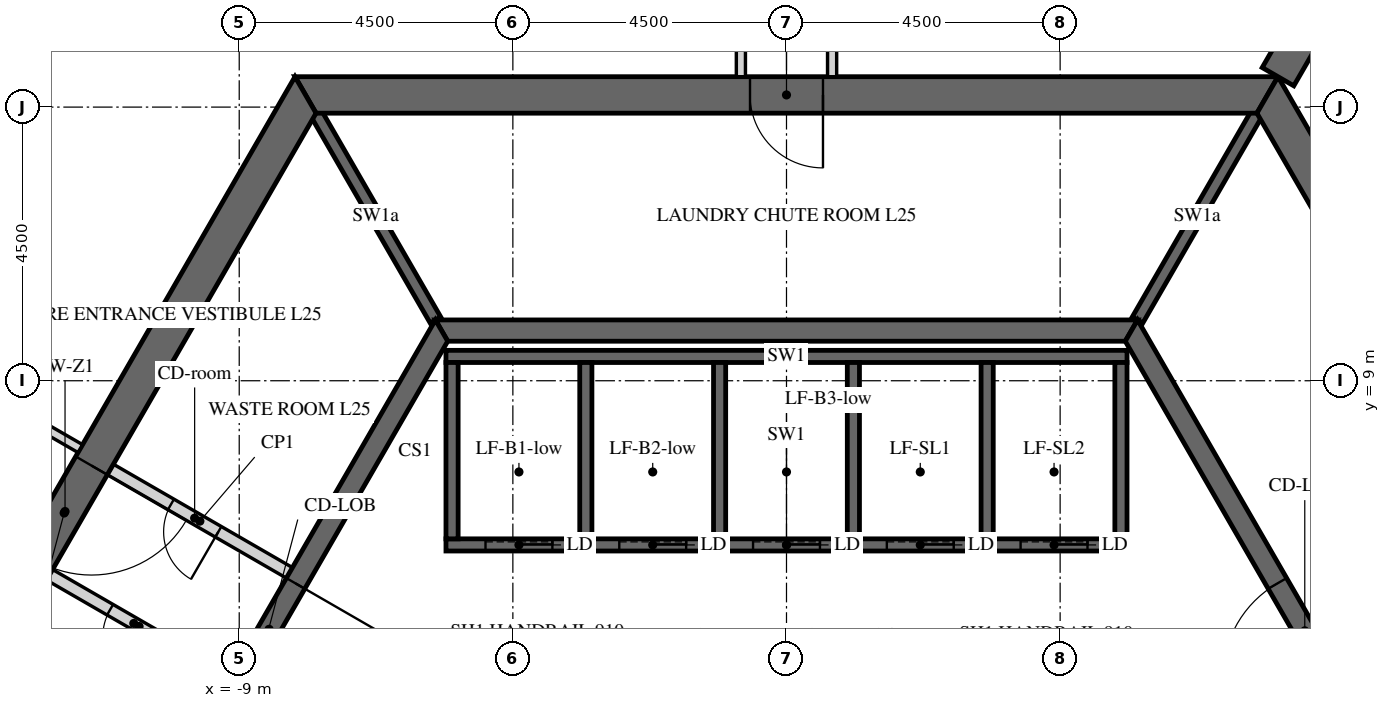
"""IFC4 building model, lengths in metres.
Left out: names, types, materials, properties, quantities, classifications, styles, units other than length and angle.
Written with IfcOpenShell. Run it as: python <this file> out.ifc"""

import sys

from ifc_helpers import new_model, si_unit, direction, frame, frame_2d, origin, place, context, subcontext, project, spatial, polyline, rectangle, outline, extrude, element, fill, save


model = new_model("IFC4")
c1 = context("Model", 3, precision=1e-05, world=origin(), true_north=direction((0.0, 1.0)))
c2 = subcontext(c1, "Body", "Model", "MODEL_VIEW")
j1 = project(units=[si_unit("LENGTHUNIT", "METRE"), si_unit("PLANEANGLEUNIT", "RADIAN")], contexts=[c1])
p1 = place(None, origin())
s1 = spatial("IfcSite", under=j1, at=p1, CompositionType="ELEMENT")
p2 = place(p1, origin())
s2 = spatial("IfcBuilding", under=s1, at=p2, CompositionType="ELEMENT")
p3 = place(p2, frame((0.0, 0.0, 111.6)))
s3 = spatial("IfcBuildingStorey", under=s2, at=p3, CompositionType="ELEMENT", Elevation=111.6)
p4 = place(p3, frame((-7.91, 13.7, -0.15), z_axis=(0.0, 0.0, 1.0), x_axis=(-0.499999880136, -0.866025472988, 0.0)))
e1 = element("IfcWall", 1, at=p4, inside=s3, PredefinedType="SHEAR", context=c2, shape_type="SweptSolid", body=[
    extrude(outline(polyline([(-0.173, -0.3), (15.993, -0.3), (15.646, 0.3), (0.173, 0.3), (-0.173, -0.3)])), origin(), (0.0, 0.0, 1.0), 3.9),
])
p5 = place(p4, frame((7.039, 0.0, 0.15)))
e2 = element("IfcOpeningElement", 2, at=p5, cuts=e1, PredefinedType="OPENING", context=c2, shape_type="SweptSolid", body=[
    extrude(rectangle(XDim=1.8, YDim=2.4, at=frame_2d((0.9, 1.2))), frame((0.0, 0.31, 0.0), z_axis=(0.0, -1.0, 0.0), x_axis=(1.0, 0.0, 0.0)), (0.0, 0.0, 1.0), 0.62),
])
p6 = place(p3, frame((15.819, 0.0, -0.15), z_axis=(0.0, 0.0, 1.0), x_axis=(-0.499999880136, 0.866025472988, 0.0)))
e3 = element("IfcWall", 3, at=p6, inside=s3, PredefinedType="SHEAR", context=c2, shape_type="SweptSolid", body=[
    extrude(outline(polyline([(-0.173, -0.3), (15.993, -0.3), (15.646, 0.3), (0.173, 0.3), (-0.173, -0.3)])), origin(), (0.0, 0.0, 1.0), 3.9),
])
p7 = place(p6, frame((6.981, 0.0, 0.15)))
e4 = element("IfcOpeningElement", 4, at=p7, cuts=e3, PredefinedType="OPENING", context=c2, shape_type="SweptSolid", body=[
    extrude(rectangle(XDim=1.8, YDim=2.4, at=frame_2d((0.9, 1.2))), frame((0.0, 0.31, 0.0), z_axis=(0.0, -1.0, 0.0), x_axis=(1.0, 0.0, 0.0)), (0.0, 0.0, 1.0), 0.62),
])
p8 = place(p3, frame((7.91, 13.7, -0.15), z_axis=(0.0, 0.0, 1.0), x_axis=(-1.0, 0.0, 0.0)))
e5 = element("IfcWall", 5, at=p8, inside=s3, PredefinedType="SHEAR", context=c2, shape_type="SweptSolid", body=[
    extrude(outline(polyline([(-0.173, -0.3), (15.993, -0.3), (15.646, 0.3), (0.173, 0.3), (-0.173, -0.3)])), origin(), (0.0, 0.0, 1.0), 3.9),
])
p9 = place(p8, frame((7.31, 0.0, 0.15)))
e6 = element("IfcOpeningElement", 6, at=p9, cuts=e5, PredefinedType="OPENING", context=c2, shape_type="SweptSolid", body=[
    extrude(rectangle(XDim=1.2, YDim=2.4, at=frame_2d((0.6, 1.2))), frame((0.0, 0.31, 0.0), z_axis=(0.0, -1.0, 0.0), x_axis=(1.0, 0.0, 0.0)), (0.0, 0.0, 1.0), 0.62),
])
p10 = place(p3, frame((8.083, 14.0, -0.15), z_axis=(0.0, 0.0, 1.0), x_axis=(0.499997680643, 0.866026742862, 0.0)))
e7 = element("IfcWall", 7, at=p10, inside=s3, PredefinedType="SHEAR", context=c2, shape_type="SweptSolid", body=[
    extrude(rectangle(XDim=16.509, YDim=0.6, at=frame_2d((8.254, 0.0))), origin(), (0.0, 0.0, 1.0), 3.9),
])
p11 = place(p10, frame((7.354, 0.0, 0.15)))
e8 = element("IfcOpeningElement", 8, at=p11, cuts=e7, PredefinedType="OPENING", context=c2, shape_type="SweptSolid", body=[
    extrude(rectangle(XDim=1.8, YDim=2.4, at=frame_2d((0.9, 1.2))), frame((0.0, 0.31, 0.0), z_axis=(0.0, -1.0, 0.0), x_axis=(1.0, 0.0, 0.0)), (0.0, 0.0, 1.0), 0.62),
])
p12 = place(p3, frame((-5.673, 9.825, -0.15), z_axis=(0.0, 0.0, 1.0), x_axis=(-0.499995046907, -0.866028263435, 0.0)))
e9 = element("IfcWall", 9, at=p12, inside=s3, PredefinedType="SHEAR", context=c2, shape_type="SweptSolid", body=[
    extrude(outline(polyline([(-0.101, -0.175), (11.446, -0.175), (11.244, 0.175), (0.101, 0.175), (-0.101, -0.175)])), origin(), (0.0, 0.0, 1.0), 3.9),
])
p13 = place(p12, frame((4.801, 0.0, 0.15)))
e10 = element("IfcOpeningElement", 10, at=p13, cuts=e9, PredefinedType="OPENING", context=c2, shape_type="SweptSolid", body=[
    extrude(rectangle(XDim=1.8, YDim=2.4, at=frame_2d((0.9, 1.2))), frame((0.0, 0.185, 0.0), z_axis=(0.0, -1.0, 0.0), x_axis=(1.0, 0.0, 0.0)), (0.0, 0.0, 1.0), 0.37),
])
p14 = place(p3, frame((11.345, 0.0, -0.15), z_axis=(0.0, 0.0, 1.0), x_axis=(-0.499995046907, 0.866028263435, 0.0)))
e11 = element("IfcWall", 11, at=p14, inside=s3, PredefinedType="SHEAR", context=c2, shape_type="SweptSolid", body=[
    extrude(outline(polyline([(-0.101, -0.175), (11.446, -0.175), (11.244, 0.175), (0.101, 0.175), (-0.101, -0.175)])), origin(), (0.0, 0.0, 1.0), 3.9),
])
p15 = place(p14, frame((4.744, 0.0, 0.15)))
e12 = element("IfcOpeningElement", 12, at=p15, cuts=e11, PredefinedType="OPENING", context=c2, shape_type="SweptSolid", body=[
    extrude(rectangle(XDim=1.8, YDim=2.4, at=frame_2d((0.9, 1.2))), frame((0.0, 0.185, 0.0), z_axis=(0.0, -1.0, 0.0), x_axis=(1.0, 0.0, 0.0)), (0.0, 0.0, 1.0), 0.37),
])
p16 = place(p3, frame((5.673, 9.825, -0.15), z_axis=(0.0, 0.0, 1.0), x_axis=(-1.0, 0.0, 0.0)))
e13 = element("IfcWall", 13, at=p16, inside=s3, PredefinedType="SHEAR", context=c2, shape_type="SweptSolid", body=[
    extrude(outline(polyline([(-0.101, -0.175), (11.446, -0.175), (11.244, 0.175), (0.101, 0.175), (-0.101, -0.175)])), origin(), (0.0, 0.0, 1.0), 3.9),
])
p17 = place(p3, frame((-5.6, 6.3, -0.25), z_axis=(0.0, 0.0, 1.0), x_axis=(1.0, 0.0, 0.0)))
e14 = element("IfcWall", 14, at=p17, inside=s3, PredefinedType="SHEAR", context=c2, shape_type="SweptSolid", body=[
    extrude(rectangle(XDim=11.2, YDim=0.2, at=frame_2d((5.6, 0.0))), origin(), (0.0, 0.0, 1.0), 3.9),
])
p18 = place(p17, frame((0.65, 0.0, 0.25)))
e15 = element("IfcOpeningElement", 15, at=p18, cuts=e14, PredefinedType="OPENING", context=c2, shape_type="SweptSolid", body=[
    extrude(rectangle(XDim=1.1, YDim=2.1, at=frame_2d((0.55, 1.05))), frame((0.0, 0.11, 0.0), z_axis=(0.0, -1.0, 0.0), x_axis=(1.0, 0.0, 0.0)), (0.0, 0.0, 1.0), 0.22),
])
p19 = place(p17, frame((2.85, 0.0, 0.25)))
e16 = element("IfcOpeningElement", 16, at=p19, cuts=e14, PredefinedType="OPENING", context=c2, shape_type="SweptSolid", body=[
    extrude(rectangle(XDim=1.1, YDim=2.1, at=frame_2d((0.55, 1.05))), frame((0.0, 0.11, 0.0), z_axis=(0.0, -1.0, 0.0), x_axis=(1.0, 0.0, 0.0)), (0.0, 0.0, 1.0), 0.22),
])
p20 = place(p17, frame((5.05, 0.0, 0.25)))
e17 = element("IfcOpeningElement", 17, at=p20, cuts=e14, PredefinedType="OPENING", context=c2, shape_type="SweptSolid", body=[
    extrude(rectangle(XDim=1.1, YDim=2.1, at=frame_2d((0.55, 1.05))), frame((0.0, 0.11, 0.0), z_axis=(0.0, -1.0, 0.0), x_axis=(1.0, 0.0, 0.0)), (0.0, 0.0, 1.0), 0.22),
])
p21 = place(p17, frame((7.25, 0.0, 0.25)))
e18 = element("IfcOpeningElement", 18, at=p21, cuts=e14, PredefinedType="OPENING", context=c2, shape_type="SweptSolid", body=[
    extrude(rectangle(XDim=1.1, YDim=2.1, at=frame_2d((0.55, 1.05))), frame((0.0, 0.11, 0.0), z_axis=(0.0, -1.0, 0.0), x_axis=(1.0, 0.0, 0.0)), (0.0, 0.0, 1.0), 0.22),
])
p22 = place(p17, frame((9.45, 0.0, 0.25)))
e19 = element("IfcOpeningElement", 19, at=p22, cuts=e14, PredefinedType="OPENING", context=c2, shape_type="SweptSolid", body=[
    extrude(rectangle(XDim=1.1, YDim=2.1, at=frame_2d((0.55, 1.05))), frame((0.0, 0.11, 0.0), z_axis=(0.0, -1.0, 0.0), x_axis=(1.0, 0.0, 0.0)), (0.0, 0.0, 1.0), 0.22),
])
p23 = place(p3, frame((-5.6, 9.4, -0.25), z_axis=(0.0, 0.0, 1.0), x_axis=(1.0, 0.0, 0.0)))
e20 = element("IfcWall", 20, at=p23, inside=s3, PredefinedType="SHEAR", context=c2, shape_type="SweptSolid", body=[
    extrude(rectangle(XDim=11.2, YDim=0.2, at=frame_2d((5.6, 0.0))), origin(), (0.0, 0.0, 1.0), 3.9),
])
for number, where, z_axis, x_axis in (
    (21, (-5.5, 6.4, -0.25), (0.0, 0.0, 1.0), (0.0, 1.0, 0.0)),
    (22, (-3.3, 6.4, -0.25), (0.0, 0.0, 1.0), (0.0, 1.0, 0.0)),
    (23, (-1.1, 6.4, -0.25), (0.0, 0.0, 1.0), (0.0, 1.0, 0.0)),
    (24, (1.1, 6.4, -0.25), (0.0, 0.0, 1.0), (0.0, 1.0, 0.0)),
    (25, (3.3, 6.4, -0.25), (0.0, 0.0, 1.0), (0.0, 1.0, 0.0)),
    (26, (5.5, 6.4, -0.25), (0.0, 0.0, 1.0), (0.0, 1.0, 0.0)),
):
    element("IfcWall", number, at=place(p3, frame(where, z_axis=z_axis, x_axis=x_axis)), inside=s3, PredefinedType="SHEAR", context=c2, shape_type="SweptSolid", body=[
        extrude(rectangle(XDim=2.9, YDim=0.2, at=frame_2d((1.45, 0.0))), origin(), (0.0, 0.0, 1.0), 3.9),
    ])
for number, where, z_axis, x_axis in (
    (27, (5.773, 10.0, -0.15), (0.0, 0.0, 1.0), (0.5, 0.866, 0.0)),
    (28, (-5.773, 10.0, -0.15), (0.0, 0.0, 1.0), (-0.5, 0.866, 0.0)),
):
    element("IfcWall", number, at=place(p3, frame(where, z_axis=z_axis, x_axis=x_axis)), inside=s3, PredefinedType="SHEAR", context=c2, shape_type="SweptSolid", body=[
        extrude(rectangle(XDim=3.926, YDim=0.2, at=frame_2d((1.963, 0.0))), origin(), (0.0, 0.0, 1.0), 3.9),
    ])
p24 = place(p3, frame((-9.175, 4.109, 0.0), z_axis=(0.0, 0.0, 1.0), x_axis=(-0.865989465428, 0.500062241894, 0.0)))
e29 = element("IfcWall", 29, at=p24, inside=s3, PredefinedType="PARTITIONING", context=c2, shape_type="SweptSolid", body=[
    extrude(rectangle(XDim=3.4, YDim=0.2, at=frame_2d((1.7, 0.0))), origin(), (0.0, 0.0, 1.0), 3.65),
])
p25 = place(p24, frame((1.351, 0.0, 0.0)))
e30 = element("IfcOpeningElement", 30, at=p25, cuts=e29, PredefinedType="OPENING", context=c2, shape_type="SweptSolid", body=[
    extrude(rectangle(XDim=0.9, YDim=2.1, at=frame_2d((0.45, 1.05))), frame((0.0, 0.11, 0.0), z_axis=(0.0, -1.0, 0.0), x_axis=(1.0, 0.0, 0.0)), (0.0, 0.0, 1.0), 0.22),
])
p26 = place(p3, frame((-8.175, 5.841, 0.0), z_axis=(0.0, 0.0, 1.0), x_axis=(-0.866020560687, 0.500008388397, 0.0)))
e31 = element("IfcWall", 31, at=p26, inside=s3, PredefinedType="PARTITIONING", context=c2, shape_type="SweptSolid", body=[
    extrude(rectangle(XDim=3.4, YDim=0.2, at=frame_2d((1.7, 0.0))), origin(), (0.0, 0.0, 1.0), 3.65),
])
p27 = place(p26, frame((1.35, 0.0, 0.0)))
e32 = element("IfcOpeningElement", 32, at=p27, cuts=e31, PredefinedType="OPENING", context=c2, shape_type="SweptSolid", body=[
    extrude(rectangle(XDim=0.9, YDim=2.1, at=frame_2d((0.45, 1.05))), frame((0.0, 0.11, 0.0), z_axis=(0.0, -1.0, 0.0), x_axis=(1.0, 0.0, 0.0)), (0.0, 0.0, 1.0), 0.22),
])
p28 = place(p3, frame((-11.614, 7.884, 0.0), z_axis=(0.0, 0.0, 1.0), x_axis=(-0.866025438137, 0.4999999405, 0.0)))
e33 = element("IfcWall", 33, at=p28, inside=s3, PredefinedType="PARTITIONING", context=c2, shape_type="SweptSolid", body=[
    extrude(rectangle(XDim=6.271, YDim=0.15, at=frame_2d((3.135, 0.0))), origin(), (0.0, 0.0, 1.0), 2.988),
])
p29 = place(p3, frame((-0.75, 20.075, 0.0), z_axis=(0.0, 0.0, 1.0), x_axis=(0.0, -1.0, 0.0)))
e34 = element("IfcWall", 34, at=p29, inside=s3, PredefinedType="PARTITIONING", context=c2, shape_type="SweptSolid", body=[
    extrude(rectangle(XDim=6.075, YDim=0.15, at=frame_2d((3.038, 0.0))), origin(), (0.0, 0.0, 1.0), 2.988),
])
p30 = place(p3, frame((0.75, 14.0, 0.0), z_axis=(0.0, 0.0, 1.0), x_axis=(0.0, 1.0, 0.0)))
e35 = element("IfcWall", 35, at=p30, inside=s3, PredefinedType="PARTITIONING", context=c2, shape_type="SweptSolid", body=[
    extrude(rectangle(XDim=6.15, YDim=0.15, at=frame_2d((3.075, 0.0))), origin(), (0.0, 0.0, 1.0), 2.988),
])
p31 = place(p5, origin())
e36 = element("IfcDoor", 36, at=p31, inside=s3, OperationType="DOUBLE_DOOR_SINGLE_SWING", PredefinedType="DOOR", context=c2, shape_type="SweptSolid", body=[
    extrude(rectangle(XDim=1.8, YDim=2.4, at=frame_2d((0.9, 1.2))), frame((0.0, 0.025, 0.0), z_axis=(0.0, -1.0, 0.0), x_axis=(1.0, 0.0, 0.0)), (0.0, 0.0, 1.0), 0.05),
])
fill(e2, e36)
p32 = place(p9, origin())
e37 = element("IfcDoor", 37, at=p32, inside=s3, OperationType="SINGLE_SWING_LEFT", PredefinedType="DOOR", context=c2, shape_type="SweptSolid", body=[
    extrude(rectangle(XDim=1.2, YDim=2.4, at=frame_2d((0.6, 1.2))), frame((0.0, 0.025, 0.0), z_axis=(0.0, -1.0, 0.0), x_axis=(1.0, 0.0, 0.0)), (0.0, 0.0, 1.0), 0.05),
])
fill(e6, e37)
p33 = place(p13, origin())
e38 = element("IfcDoor", 38, at=p33, inside=s3, OperationType="DOUBLE_DOOR_SINGLE_SWING", PredefinedType="DOOR", context=c2, shape_type="SweptSolid", body=[
    extrude(rectangle(XDim=1.8, YDim=2.4, at=frame_2d((0.9, 1.2))), frame((0.0, 0.025, 0.0), z_axis=(0.0, -1.0, 0.0), x_axis=(1.0, 0.0, 0.0)), (0.0, 0.0, 1.0), 0.05),
])
fill(e10, e38)
p34 = place(p15, origin())
e39 = element("IfcDoor", 39, at=p34, inside=s3, OperationType="DOUBLE_DOOR_SINGLE_SWING", PredefinedType="DOOR", context=c2, shape_type="SweptSolid", body=[
    extrude(rectangle(XDim=1.8, YDim=2.4, at=frame_2d((0.9, 1.2))), frame((0.0, 0.025, 0.0), z_axis=(0.0, -1.0, 0.0), x_axis=(1.0, 0.0, 0.0)), (0.0, 0.0, 1.0), 0.05),
])
fill(e12, e39)
p35 = place(p25, origin())
e40 = element("IfcDoor", 40, at=p35, inside=s3, OperationType="SINGLE_SWING_LEFT", PredefinedType="DOOR", context=c2, shape_type="SweptSolid", body=[
    extrude(rectangle(XDim=0.9, YDim=2.1, at=frame_2d((0.45, 1.05))), frame((0.0, 0.025, 0.0), z_axis=(0.0, -1.0, 0.0), x_axis=(1.0, 0.0, 0.0)), (0.0, 0.0, 1.0), 0.05),
])
fill(e30, e40)
p36 = place(p27, origin())
e41 = element("IfcDoor", 41, at=p36, inside=s3, OperationType="SINGLE_SWING_LEFT", PredefinedType="DOOR", context=c2, shape_type="SweptSolid", body=[
    extrude(rectangle(XDim=0.9, YDim=2.1, at=frame_2d((0.45, 1.05))), frame((0.0, 0.025, 0.0), z_axis=(0.0, -1.0, 0.0), x_axis=(1.0, 0.0, 0.0)), (0.0, 0.0, 1.0), 0.05),
])
fill(e32, e41)
p37 = place(p18, origin())
e42 = element("IfcDoor", 42, at=p37, inside=s3, OperationType="SLIDING_TO_LEFT", PredefinedType="DOOR", context=c2, shape_type="SweptSolid", body=[
    extrude(rectangle(XDim=1.1, YDim=2.1, at=frame_2d((0.55, 1.05))), frame((0.0, 0.025, 0.0), z_axis=(0.0, -1.0, 0.0), x_axis=(1.0, 0.0, 0.0)), (0.0, 0.0, 1.0), 0.05),
])
fill(e15, e42)
p38 = place(p19, origin())
e43 = element("IfcDoor", 43, at=p38, inside=s3, OperationType="SLIDING_TO_LEFT", PredefinedType="DOOR", context=c2, shape_type="SweptSolid", body=[
    extrude(rectangle(XDim=1.1, YDim=2.1, at=frame_2d((0.55, 1.05))), frame((0.0, 0.025, 0.0), z_axis=(0.0, -1.0, 0.0), x_axis=(1.0, 0.0, 0.0)), (0.0, 0.0, 1.0), 0.05),
])
fill(e16, e43)
p39 = place(p20, origin())
e44 = element("IfcDoor", 44, at=p39, inside=s3, OperationType="SLIDING_TO_LEFT", PredefinedType="DOOR", context=c2, shape_type="SweptSolid", body=[
    extrude(rectangle(XDim=1.1, YDim=2.1, at=frame_2d((0.55, 1.05))), frame((0.0, 0.025, 0.0), z_axis=(0.0, -1.0, 0.0), x_axis=(1.0, 0.0, 0.0)), (0.0, 0.0, 1.0), 0.05),
])
fill(e17, e44)
p40 = place(p21, origin())
e45 = element("IfcDoor", 45, at=p40, inside=s3, OperationType="SLIDING_TO_LEFT", PredefinedType="DOOR", context=c2, shape_type="SweptSolid", body=[
    extrude(rectangle(XDim=1.1, YDim=2.1, at=frame_2d((0.55, 1.05))), frame((0.0, 0.025, 0.0), z_axis=(0.0, -1.0, 0.0), x_axis=(1.0, 0.0, 0.0)), (0.0, 0.0, 1.0), 0.05),
])
fill(e18, e45)
p41 = place(p22, origin())
e46 = element("IfcDoor", 46, at=p41, inside=s3, OperationType="SLIDING_TO_LEFT", PredefinedType="DOOR", context=c2, shape_type="SweptSolid", body=[
    extrude(rectangle(XDim=1.1, YDim=2.1, at=frame_2d((0.55, 1.05))), frame((0.0, 0.025, 0.0), z_axis=(0.0, -1.0, 0.0), x_axis=(1.0, 0.0, 0.0)), (0.0, 0.0, 1.0), 0.05),
])
fill(e19, e46)
save(model, sys.argv[1])
